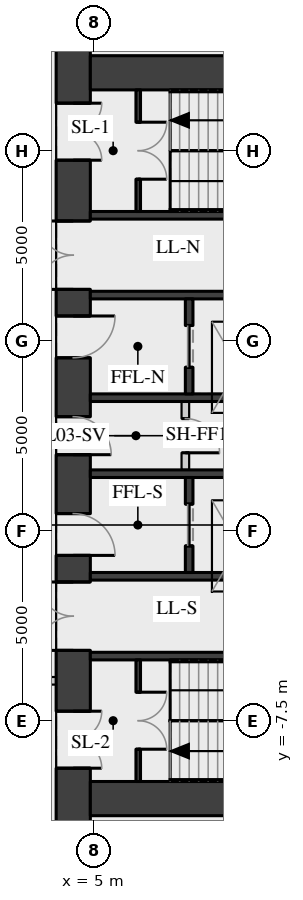
"""IFC4 building model, lengths in metres.
Left out: names, types, materials, properties, quantities, classifications, styles, units other than length and angle.
Written with IfcOpenShell. Run it as: python <this file> out.ifc"""

import sys

from ifc_helpers import new_model, si_unit, direction, frame, frame_2d, origin, place, context, subcontext, project, spatial, rectangle, extrude, element, fill, save


model = new_model("IFC4")
c1 = context("Model", 3, precision=1e-05, world=origin(), true_north=direction((0.0, 1.0)))
c2 = subcontext(c1, "Body", "Model", "MODEL_VIEW")
j1 = project(units=[si_unit("LENGTHUNIT", "METRE"), si_unit("PLANEANGLEUNIT", "RADIAN")], contexts=[c1])
p1 = place(None, origin())
s1 = spatial("IfcSite", under=j1, at=p1, CompositionType="ELEMENT")
p2 = place(p1, origin())
s2 = spatial("IfcBuilding", under=s1, at=p2, CompositionType="ELEMENT")
p3 = place(p2, frame((0.0, 0.0, 17.5)))
s3 = spatial("IfcBuildingStorey", under=s2, at=p3, CompositionType="ELEMENT", Elevation=17.5)
p4 = place(p3, frame((4.45, -11.1, 0.0), z_axis=(0.0, 0.0, 1.0), x_axis=(0.0, 1.0, 0.0)))
e1 = element("IfcWall", 1, at=p4, inside=s3, PredefinedType="SHEAR", context=c2, shape_type="SweptSolid", body=[
    extrude(rectangle(XDim=22.2, YDim=0.9, at=frame_2d((11.1, 0.0))), origin(), (0.0, 0.0, 1.0), 3.92),
])
p5 = place(p4, frame((2.35, 0.0, 0.0)))
e2 = element("IfcOpeningElement", 2, at=p5, cuts=e1, PredefinedType="OPENING", context=c2, shape_type="SweptSolid", body=[
    extrude(rectangle(XDim=1.5, YDim=2.1, at=frame_2d((0.75, 1.05))), frame((0.0, 0.46, 0.0), z_axis=(0.0, -1.0, 0.0), x_axis=(1.0, 0.0, 0.0)), (0.0, 0.0, 1.0), 0.92),
])
p6 = place(p4, frame((5.45, 0.0, 0.0)))
e3 = element("IfcOpeningElement", 3, at=p6, cuts=e1, PredefinedType="OPENING", context=c2, shape_type="SweptSolid", body=[
    extrude(rectangle(XDim=1.8, YDim=2.1, at=frame_2d((0.9, 1.05))), frame((0.0, 0.46, 0.0), z_axis=(0.0, -1.0, 0.0), x_axis=(1.0, 0.0, 0.0)), (0.0, 0.0, 1.0), 0.92),
])
p7 = place(p4, frame((7.95, 0.0, 0.0)))
e4 = element("IfcOpeningElement", 4, at=p7, cuts=e1, PredefinedType="OPENING", context=c2, shape_type="SweptSolid", body=[
    extrude(rectangle(XDim=1.1, YDim=2.1, at=frame_2d((0.55, 1.05))), frame((0.0, 0.46, 0.0), z_axis=(0.0, -1.0, 0.0), x_axis=(1.0, 0.0, 0.0)), (0.0, 0.0, 1.0), 0.92),
])
p8 = place(p4, frame((10.6, 0.0, 0.0)))
e5 = element("IfcOpeningElement", 5, at=p8, cuts=e1, PredefinedType="OPENING", context=c2, shape_type="SweptSolid", body=[
    extrude(rectangle(XDim=1.0, YDim=2.1, at=frame_2d((0.5, 1.05))), frame((0.0, 0.46, 0.0), z_axis=(0.0, -1.0, 0.0), x_axis=(1.0, 0.0, 0.0)), (0.0, 0.0, 1.0), 0.92),
])
p9 = place(p4, frame((13.15, 0.0, 0.0)))
e6 = element("IfcOpeningElement", 6, at=p9, cuts=e1, PredefinedType="OPENING", context=c2, shape_type="SweptSolid", body=[
    extrude(rectangle(XDim=1.1, YDim=2.1, at=frame_2d((0.55, 1.05))), frame((0.0, 0.46, 0.0), z_axis=(0.0, -1.0, 0.0), x_axis=(1.0, 0.0, 0.0)), (0.0, 0.0, 1.0), 0.92),
])
p10 = place(p4, frame((14.95, 0.0, 0.0)))
e7 = element("IfcOpeningElement", 7, at=p10, cuts=e1, PredefinedType="OPENING", context=c2, shape_type="SweptSolid", body=[
    extrude(rectangle(XDim=1.8, YDim=2.1, at=frame_2d((0.9, 1.05))), frame((0.0, 0.46, 0.0), z_axis=(0.0, -1.0, 0.0), x_axis=(1.0, 0.0, 0.0)), (0.0, 0.0, 1.0), 0.92),
])
p11 = place(p4, frame((18.35, 0.0, 0.0)))
e8 = element("IfcOpeningElement", 8, at=p11, cuts=e1, PredefinedType="OPENING", context=c2, shape_type="SweptSolid", body=[
    extrude(rectangle(XDim=1.5, YDim=2.1, at=frame_2d((0.75, 1.05))), frame((0.0, 0.46, 0.0), z_axis=(0.0, -1.0, 0.0), x_axis=(1.0, 0.0, 0.0)), (0.0, 0.0, 1.0), 0.92),
])
for number, where, z_axis, x_axis in (
    (9, (4.9, 9.55, 0.0), (0.0, 0.0, 1.0), (1.0, 0.0, 0.0)),
    (10, (4.9, -9.55, 0.0), (0.0, 0.0, 1.0), (1.0, 0.0, 0.0)),
):
    element("IfcWall", number, at=place(p3, frame(where, z_axis=z_axis, x_axis=x_axis)), inside=s3, PredefinedType="SHEAR", context=c2, shape_type="SweptSolid", body=[
        extrude(rectangle(XDim=10.2, YDim=0.9, at=frame_2d((5.1, 0.0))), origin(), (0.0, 0.0, 1.0), 3.92),
    ])
p12 = place(p3, frame((4.9, 5.8, 0.0), z_axis=(0.0, 0.0, 1.0), x_axis=(1.0, 0.0, 0.0)))
e11 = element("IfcWall", 11, at=p12, inside=s3, PredefinedType="SHEAR", context=c2, shape_type="SweptSolid", body=[
    extrude(rectangle(XDim=10.2, YDim=0.2, at=frame_2d((5.1, 0.0))), origin(), (0.0, 0.0, 1.0), 3.92),
])
p13 = place(p12, frame((6.75, 0.0, 0.0)))
e12 = element("IfcOpeningElement", 12, at=p13, cuts=e11, PredefinedType="OPENING", context=c2, shape_type="SweptSolid", body=[
    extrude(rectangle(XDim=1.1, YDim=2.1, at=frame_2d((0.55, 1.05))), frame((0.0, 0.11, 0.0), z_axis=(0.0, -1.0, 0.0), x_axis=(1.0, 0.0, 0.0)), (0.0, 0.0, 1.0), 0.22),
])
p14 = place(p12, frame((8.75, 0.0, 0.0)))
e13 = element("IfcOpeningElement", 13, at=p14, cuts=e11, PredefinedType="OPENING", context=c2, shape_type="SweptSolid", body=[
    extrude(rectangle(XDim=1.1, YDim=2.1, at=frame_2d((0.55, 1.05))), frame((0.0, 0.11, 0.0), z_axis=(0.0, -1.0, 0.0), x_axis=(1.0, 0.0, 0.0)), (0.0, 0.0, 1.0), 0.22),
])
p15 = place(p3, frame((4.9, 3.7, 0.0), z_axis=(0.0, 0.0, 1.0), x_axis=(1.0, 0.0, 0.0)))
e14 = element("IfcWall", 14, at=p15, inside=s3, PredefinedType="SHEAR", context=c2, shape_type="SweptSolid", body=[
    extrude(rectangle(XDim=10.2, YDim=0.2, at=frame_2d((5.1, 0.0))), origin(), (0.0, 0.0, 1.0), 3.92),
])
p16 = place(p15, frame((6.3, 0.0, 0.0)))
e15 = element("IfcOpeningElement", 15, at=p16, cuts=e14, PredefinedType="OPENING", context=c2, shape_type="SweptSolid", body=[
    extrude(rectangle(XDim=1.1, YDim=2.1, at=frame_2d((0.55, 1.05))), frame((0.0, 0.11, 0.0), z_axis=(0.0, -1.0, 0.0), x_axis=(1.0, 0.0, 0.0)), (0.0, 0.0, 1.0), 0.22),
])
p17 = place(p15, frame((8.6, 0.0, 0.0)))
e16 = element("IfcOpeningElement", 16, at=p17, cuts=e14, PredefinedType="OPENING", context=c2, shape_type="SweptSolid", body=[
    extrude(rectangle(XDim=1.1, YDim=2.1, at=frame_2d((0.55, 1.05))), frame((0.0, 0.11, 0.0), z_axis=(0.0, -1.0, 0.0), x_axis=(1.0, 0.0, 0.0)), (0.0, 0.0, 1.0), 0.22),
])
for number, where, z_axis, x_axis in (
    (17, (4.9, 1.0, 0.0), (0.0, 0.0, 1.0), (1.0, 0.0, 0.0)),
    (18, (4.9, -1.0, 0.0), (0.0, 0.0, 1.0), (1.0, 0.0, 0.0)),
):
    element("IfcWall", number, at=place(p3, frame(where, z_axis=z_axis, x_axis=x_axis)), inside=s3, PredefinedType="SHEAR", context=c2, shape_type="SweptSolid", body=[
        extrude(rectangle(XDim=10.2, YDim=0.2, at=frame_2d((5.1, 0.0))), origin(), (0.0, 0.0, 1.0), 3.92),
    ])
p18 = place(p3, frame((4.9, -3.7, 0.0), z_axis=(0.0, 0.0, 1.0), x_axis=(1.0, 0.0, 0.0)))
e19 = element("IfcWall", 19, at=p18, inside=s3, PredefinedType="SHEAR", context=c2, shape_type="SweptSolid", body=[
    extrude(rectangle(XDim=10.2, YDim=0.2, at=frame_2d((5.1, 0.0))), origin(), (0.0, 0.0, 1.0), 3.92),
])
p19 = place(p18, frame((6.3, 0.0, 0.0)))
e20 = element("IfcOpeningElement", 20, at=p19, cuts=e19, PredefinedType="OPENING", context=c2, shape_type="SweptSolid", body=[
    extrude(rectangle(XDim=1.1, YDim=2.1, at=frame_2d((0.55, 1.05))), frame((0.0, 0.11, 0.0), z_axis=(0.0, -1.0, 0.0), x_axis=(1.0, 0.0, 0.0)), (0.0, 0.0, 1.0), 0.22),
])
p20 = place(p18, frame((8.6, 0.0, 0.0)))
e21 = element("IfcOpeningElement", 21, at=p20, cuts=e19, PredefinedType="OPENING", context=c2, shape_type="SweptSolid", body=[
    extrude(rectangle(XDim=1.1, YDim=2.1, at=frame_2d((0.55, 1.05))), frame((0.0, 0.11, 0.0), z_axis=(0.0, -1.0, 0.0), x_axis=(1.0, 0.0, 0.0)), (0.0, 0.0, 1.0), 0.22),
])
p21 = place(p3, frame((4.9, -5.8, 0.0), z_axis=(0.0, 0.0, 1.0), x_axis=(1.0, 0.0, 0.0)))
e22 = element("IfcWall", 22, at=p21, inside=s3, PredefinedType="SHEAR", context=c2, shape_type="SweptSolid", body=[
    extrude(rectangle(XDim=10.2, YDim=0.2, at=frame_2d((5.1, 0.0))), origin(), (0.0, 0.0, 1.0), 3.92),
])
p22 = place(p3, frame((7.5, 1.1, 0.0), z_axis=(0.0, 0.0, 1.0), x_axis=(0.0, 1.0, 0.0)))
e23 = element("IfcWall", 23, at=p22, inside=s3, PredefinedType="SHEAR", context=c2, shape_type="SweptSolid", body=[
    extrude(rectangle(XDim=2.5, YDim=0.2, at=frame_2d((1.25, 0.0))), origin(), (0.0, 0.0, 1.0), 3.92),
])
p23 = place(p22, frame((0.7, 0.0, 0.0)))
e24 = element("IfcOpeningElement", 24, at=p23, cuts=e23, PredefinedType="OPENING", context=c2, shape_type="SweptSolid", body=[
    extrude(rectangle(XDim=1.1, YDim=2.1, at=frame_2d((0.55, 1.05))), frame((0.0, 0.11, 0.0), z_axis=(0.0, -1.0, 0.0), x_axis=(1.0, 0.0, 0.0)), (0.0, 0.0, 1.0), 0.22),
])
p24 = place(p3, frame((7.5, -3.6, 0.0), z_axis=(0.0, 0.0, 1.0), x_axis=(0.0, 1.0, 0.0)))
e25 = element("IfcWall", 25, at=p24, inside=s3, PredefinedType="SHEAR", context=c2, shape_type="SweptSolid", body=[
    extrude(rectangle(XDim=2.5, YDim=0.2, at=frame_2d((1.25, 0.0))), origin(), (0.0, 0.0, 1.0), 3.92),
])
p25 = place(p24, frame((0.7, 0.0, 0.0)))
e26 = element("IfcOpeningElement", 26, at=p25, cuts=e25, PredefinedType="OPENING", context=c2, shape_type="SweptSolid", body=[
    extrude(rectangle(XDim=1.1, YDim=2.1, at=frame_2d((0.55, 1.05))), frame((0.0, 0.11, 0.0), z_axis=(0.0, -1.0, 0.0), x_axis=(1.0, 0.0, 0.0)), (0.0, 0.0, 1.0), 0.22),
])
p26 = place(p3, frame((6.16, 5.9, 0.0), z_axis=(0.0, 0.0, 1.0), x_axis=(0.0, 1.0, 0.0)))
e27 = element("IfcWall", 27, at=p26, inside=s3, PredefinedType="SHEAR", context=c2, shape_type="SweptSolid", body=[
    extrude(rectangle(XDim=3.2, YDim=0.12, at=frame_2d((1.6, 0.0))), origin(), (0.0, 0.0, 1.0), 3.92),
])
p27 = place(p26, frame((0.85, 0.0, 0.0)))
e28 = element("IfcOpeningElement", 28, at=p27, cuts=e27, PredefinedType="OPENING", context=c2, shape_type="SweptSolid", body=[
    extrude(rectangle(XDim=1.5, YDim=2.1, at=frame_2d((0.75, 1.05))), frame((0.0, 0.07, 0.0), z_axis=(0.0, -1.0, 0.0), x_axis=(1.0, 0.0, 0.0)), (0.0, 0.0, 1.0), 0.14),
])
p28 = place(p3, frame((6.16, -9.1, 0.0), z_axis=(0.0, 0.0, 1.0), x_axis=(0.0, 1.0, 0.0)))
e29 = element("IfcWall", 29, at=p28, inside=s3, PredefinedType="SHEAR", context=c2, shape_type="SweptSolid", body=[
    extrude(rectangle(XDim=3.2, YDim=0.12, at=frame_2d((1.6, 0.0))), origin(), (0.0, 0.0, 1.0), 3.92),
])
p29 = place(p28, frame((0.85, 0.0, 0.0)))
e30 = element("IfcOpeningElement", 30, at=p29, cuts=e29, PredefinedType="OPENING", context=c2, shape_type="SweptSolid", body=[
    extrude(rectangle(XDim=1.5, YDim=2.1, at=frame_2d((0.75, 1.05))), frame((0.0, 0.07, 0.0), z_axis=(0.0, -1.0, 0.0), x_axis=(1.0, 0.0, 0.0)), (0.0, 0.0, 1.0), 0.14),
])
p30 = place(p3, frame((7.4, -0.9, 0.0), z_axis=(0.0, 0.0, 1.0), x_axis=(0.0, 1.0, 0.0)))
e31 = element("IfcWall", 31, at=p30, inside=s3, PredefinedType="PARTITIONING", context=c2, shape_type="SweptSolid", body=[
    extrude(rectangle(XDim=1.8, YDim=0.2, at=frame_2d((0.9, 0.0))), origin(), (0.0, 0.0, 1.0), 3.92),
])
p31 = place(p30, frame((0.45, 0.0, 0.0)))
e32 = element("IfcOpeningElement", 32, at=p31, cuts=e31, PredefinedType="OPENING", context=c2, shape_type="SweptSolid", body=[
    extrude(rectangle(XDim=0.9, YDim=2.1, at=frame_2d((0.45, 1.05))), frame((0.0, 0.11, 0.0), z_axis=(0.0, -1.0, 0.0), x_axis=(1.0, 0.0, 0.0)), (0.0, 0.0, 1.0), 0.22),
])
p32 = place(p3, frame((-14.6, -6.45, 0.0), z_axis=(0.0, 0.0, 1.0), x_axis=(1.0, 0.0, 0.0)))
e33 = element("IfcWall", 33, at=p32, inside=s3, PredefinedType="PARTITIONING", context=c2, shape_type="SweptSolid", body=[
    extrude(rectangle(XDim=18.602, YDim=0.2, at=frame_2d((9.301, 0.0))), origin(), (0.0, 0.0, 1.0), 3.92),
])
p33 = place(p32, frame((8.101, 0.0, 0.0)))
e34 = element("IfcOpeningElement", 34, at=p33, cuts=e33, PredefinedType="OPENING", context=c2, shape_type="SweptSolid", body=[
    extrude(rectangle(XDim=2.4, YDim=2.4, at=frame_2d((1.2, 1.2))), frame((0.0, 0.11, 0.0), z_axis=(0.0, -1.0, 0.0), x_axis=(1.0, 0.0, 0.0)), (0.0, 0.0, 1.0), 0.22),
])
p34 = place(p5, origin())
e35 = element("IfcDoor", 35, at=p34, inside=s3, OperationType="DOUBLE_DOOR_SINGLE_SWING", PredefinedType="DOOR", context=c2, shape_type="SweptSolid", body=[
    extrude(rectangle(XDim=1.5, YDim=2.1, at=frame_2d((0.75, 1.05))), frame((0.0, 0.025, 0.0), z_axis=(0.0, -1.0, 0.0), x_axis=(1.0, 0.0, 0.0)), (0.0, 0.0, 1.0), 0.05),
])
fill(e2, e35)
p35 = place(p6, origin())
e36 = element("IfcDoor", 36, at=p35, inside=s3, OperationType="DOUBLE_DOOR_SINGLE_SWING", PredefinedType="DOOR", context=c2, shape_type="SweptSolid", body=[
    extrude(rectangle(XDim=1.8, YDim=2.1, at=frame_2d((0.9, 1.05))), frame((0.0, 0.025, 0.0), z_axis=(0.0, -1.0, 0.0), x_axis=(1.0, 0.0, 0.0)), (0.0, 0.0, 1.0), 0.05),
])
fill(e3, e36)
p36 = place(p7, origin())
e37 = element("IfcDoor", 37, at=p36, inside=s3, OperationType="SINGLE_SWING_RIGHT", PredefinedType="DOOR", context=c2, shape_type="SweptSolid", body=[
    extrude(rectangle(XDim=1.1, YDim=2.1, at=frame_2d((0.55, 1.05))), frame((0.0, 0.025, 0.0), z_axis=(0.0, -1.0, 0.0), x_axis=(1.0, 0.0, 0.0)), (0.0, 0.0, 1.0), 0.05),
])
fill(e4, e37)
p37 = place(p8, origin())
e38 = element("IfcDoor", 38, at=p37, inside=s3, OperationType="SINGLE_SWING_RIGHT", PredefinedType="DOOR", context=c2, shape_type="SweptSolid", body=[
    extrude(rectangle(XDim=1.0, YDim=2.1, at=frame_2d((0.5, 1.05))), frame((0.0, 0.025, 0.0), z_axis=(0.0, -1.0, 0.0), x_axis=(1.0, 0.0, 0.0)), (0.0, 0.0, 1.0), 0.05),
])
fill(e5, e38)
p38 = place(p9, origin())
e39 = element("IfcDoor", 39, at=p38, inside=s3, OperationType="SINGLE_SWING_LEFT", PredefinedType="DOOR", context=c2, shape_type="SweptSolid", body=[
    extrude(rectangle(XDim=1.1, YDim=2.1, at=frame_2d((0.55, 1.05))), frame((0.0, 0.025, 0.0), z_axis=(0.0, -1.0, 0.0), x_axis=(1.0, 0.0, 0.0)), (0.0, 0.0, 1.0), 0.05),
])
fill(e6, e39)
p39 = place(p10, origin())
e40 = element("IfcDoor", 40, at=p39, inside=s3, OperationType="DOUBLE_DOOR_SINGLE_SWING", PredefinedType="DOOR", context=c2, shape_type="SweptSolid", body=[
    extrude(rectangle(XDim=1.8, YDim=2.1, at=frame_2d((0.9, 1.05))), frame((0.0, 0.025, 0.0), z_axis=(0.0, -1.0, 0.0), x_axis=(1.0, 0.0, 0.0)), (0.0, 0.0, 1.0), 0.05),
])
fill(e7, e40)
p40 = place(p11, origin())
e41 = element("IfcDoor", 41, at=p40, inside=s3, OperationType="DOUBLE_DOOR_SINGLE_SWING", PredefinedType="DOOR", context=c2, shape_type="SweptSolid", body=[
    extrude(rectangle(XDim=1.5, YDim=2.1, at=frame_2d((0.75, 1.05))), frame((0.0, 0.025, 0.0), z_axis=(0.0, -1.0, 0.0), x_axis=(1.0, 0.0, 0.0)), (0.0, 0.0, 1.0), 0.05),
])
fill(e8, e41)
p41 = place(p27, origin())
e42 = element("IfcDoor", 42, at=p41, inside=s3, OperationType="DOUBLE_DOOR_SINGLE_SWING", PredefinedType="DOOR", context=c2, shape_type="SweptSolid", body=[
    extrude(rectangle(XDim=1.5, YDim=2.1, at=frame_2d((0.75, 1.05))), frame((0.0, 0.025, 0.0), z_axis=(0.0, -1.0, 0.0), x_axis=(1.0, 0.0, 0.0)), (0.0, 0.0, 1.0), 0.05),
])
fill(e28, e42)
p42 = place(p29, origin())
e43 = element("IfcDoor", 43, at=p42, inside=s3, OperationType="DOUBLE_DOOR_SINGLE_SWING", PredefinedType="DOOR", context=c2, shape_type="SweptSolid", body=[
    extrude(rectangle(XDim=1.5, YDim=2.1, at=frame_2d((0.75, 1.05))), frame((0.0, 0.025, 0.0), z_axis=(0.0, -1.0, 0.0), x_axis=(1.0, 0.0, 0.0)), (0.0, 0.0, 1.0), 0.05),
])
fill(e30, e43)
p43 = place(p23, origin())
e44 = element("IfcDoor", 44, at=p43, inside=s3, OperationType="DOUBLE_DOOR_SLIDING", PredefinedType="DOOR", context=c2, shape_type="SweptSolid", body=[
    extrude(rectangle(XDim=1.1, YDim=2.1, at=frame_2d((0.55, 1.05))), frame((0.0, 0.025, 0.0), z_axis=(0.0, -1.0, 0.0), x_axis=(1.0, 0.0, 0.0)), (0.0, 0.0, 1.0), 0.05),
])
fill(e24, e44)
p44 = place(p25, origin())
e45 = element("IfcDoor", 45, at=p44, inside=s3, OperationType="DOUBLE_DOOR_SLIDING", PredefinedType="DOOR", context=c2, shape_type="SweptSolid", body=[
    extrude(rectangle(XDim=1.1, YDim=2.1, at=frame_2d((0.55, 1.05))), frame((0.0, 0.025, 0.0), z_axis=(0.0, -1.0, 0.0), x_axis=(1.0, 0.0, 0.0)), (0.0, 0.0, 1.0), 0.05),
])
fill(e26, e45)
p45 = place(p31, origin())
e46 = element("IfcDoor", 46, at=p45, inside=s3, OperationType="SINGLE_SWING_RIGHT", PredefinedType="DOOR", context=c2, shape_type="SweptSolid", body=[
    extrude(rectangle(XDim=0.9, YDim=2.1, at=frame_2d((0.45, 1.05))), frame((0.0, 0.025, 0.0), z_axis=(0.0, -1.0, 0.0), x_axis=(1.0, 0.0, 0.0)), (0.0, 0.0, 1.0), 0.05),
])
fill(e32, e46)
save(model, sys.argv[1])
